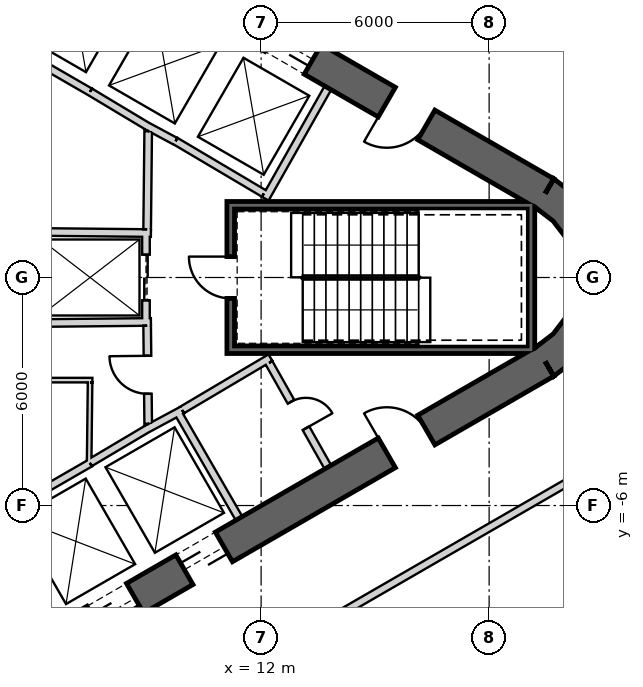
"""IFC4 building model, lengths in metres.
Left out: names, types, materials, properties, quantities, classifications, styles, units other than length and angle.
Written with IfcOpenShell. Run it as: python <this file> out.ifc"""

import sys

from ifc_helpers import new_model, si_unit, direction, frame, frame_2d, origin, place, context, subcontext, project, spatial, polyline, rectangle, outline, extrude, element, fill, save


model = new_model("IFC4")
c1 = context("Model", 3, precision=1e-05, world=origin(), true_north=direction((0.0, 1.0)))
c2 = subcontext(c1, "Body", "Model", "MODEL_VIEW")
j1 = project(units=[si_unit("LENGTHUNIT", "METRE"), si_unit("PLANEANGLEUNIT", "RADIAN")], contexts=[c1])
p1 = place(None, origin())
s1 = spatial("IfcSite", under=j1, at=p1, CompositionType="ELEMENT")
p2 = place(p1, origin())
s2 = spatial("IfcBuilding", under=s1, at=p2, CompositionType="ELEMENT")
p3 = place(p2, frame((0.0, 0.0, 94.7)))
s3 = spatial("IfcBuildingStorey", under=s2, at=p3, CompositionType="ELEMENT", Elevation=94.7)
p4 = place(p3, frame((19.475, 2.208, 0.0), z_axis=(0.0, 0.0, 1.0), x_axis=(-0.866028369851, 0.499994862586, 0.0)))
e1 = element("IfcWall", 1, at=p4, inside=s3, PredefinedType="SHEAR", context=c2, shape_type="SweptSolid", body=[
    extrude(rectangle(XDim=31.523, YDim=0.9, at=frame_2d((15.762, 0.0))), origin(), (0.0, 0.0, 1.0), 4.1),
])
p5 = place(p4, frame((7.062, 0.0, 0.0)))
e2 = element("IfcOpeningElement", 2, at=p5, cuts=e1, PredefinedType="OPENING", context=c2, shape_type="SweptSolid", body=[
    extrude(rectangle(XDim=1.2, YDim=2.4, at=frame_2d((0.6, 1.2))), frame((0.0, 0.46, 0.0), z_axis=(0.0, -1.0, 0.0), x_axis=(1.0, 0.0, 0.0)), (0.0, 0.0, 1.0), 0.92),
])
p6 = place(p4, frame((9.762, 0.0, 0.0)))
e3 = element("IfcOpeningElement", 3, at=p6, cuts=e1, PredefinedType="OPENING", context=c2, shape_type="SweptSolid", body=[
    extrude(rectangle(XDim=1.2, YDim=2.4, at=frame_2d((0.6, 1.2))), frame((0.0, 0.46, 0.0), z_axis=(0.0, -1.0, 0.0), x_axis=(1.0, 0.0, 0.0)), (0.0, 0.0, 1.0), 0.92),
])
p7 = place(p4, frame((12.462, 0.0, 0.0)))
e4 = element("IfcOpeningElement", 4, at=p7, cuts=e1, PredefinedType="OPENING", context=c2, shape_type="SweptSolid", body=[
    extrude(rectangle(XDim=1.2, YDim=2.4, at=frame_2d((0.6, 1.2))), frame((0.0, 0.46, 0.0), z_axis=(0.0, -1.0, 0.0), x_axis=(1.0, 0.0, 0.0)), (0.0, 0.0, 1.0), 0.92),
])
p8 = place(p4, frame((15.162, 0.0, 0.0)))
e5 = element("IfcOpeningElement", 5, at=p8, cuts=e1, PredefinedType="OPENING", context=c2, shape_type="SweptSolid", body=[
    extrude(rectangle(XDim=1.2, YDim=2.4, at=frame_2d((0.6, 1.2))), frame((0.0, 0.46, 0.0), z_axis=(0.0, -1.0, 0.0), x_axis=(1.0, 0.0, 0.0)), (0.0, 0.0, 1.0), 0.92),
])
p9 = place(p4, frame((17.862, 0.0, 0.0)))
e6 = element("IfcOpeningElement", 6, at=p9, cuts=e1, PredefinedType="OPENING", context=c2, shape_type="SweptSolid", body=[
    extrude(rectangle(XDim=1.2, YDim=2.4, at=frame_2d((0.6, 1.2))), frame((0.0, 0.46, 0.0), z_axis=(0.0, -1.0, 0.0), x_axis=(1.0, 0.0, 0.0)), (0.0, 0.0, 1.0), 0.92),
])
p10 = place(p4, frame((20.562, 0.0, 0.0)))
e7 = element("IfcOpeningElement", 7, at=p10, cuts=e1, PredefinedType="OPENING", context=c2, shape_type="SweptSolid", body=[
    extrude(rectangle(XDim=1.2, YDim=2.4, at=frame_2d((0.6, 1.2))), frame((0.0, 0.46, 0.0), z_axis=(0.0, -1.0, 0.0), x_axis=(1.0, 0.0, 0.0)), (0.0, 0.0, 1.0), 0.92),
])
p11 = place(p4, frame((23.262, 0.0, 0.0)))
e8 = element("IfcOpeningElement", 8, at=p11, cuts=e1, PredefinedType="OPENING", context=c2, shape_type="SweptSolid", body=[
    extrude(rectangle(XDim=1.2, YDim=2.4, at=frame_2d((0.6, 1.2))), frame((0.0, 0.46, 0.0), z_axis=(0.0, -1.0, 0.0), x_axis=(1.0, 0.0, 0.0)), (0.0, 0.0, 1.0), 0.92),
])
p12 = place(p4, frame((3.612, 0.0, 0.0)))
e9 = element("IfcOpeningElement", 9, at=p12, cuts=e1, PredefinedType="OPENING", context=c2, shape_type="SweptSolid", body=[
    extrude(rectangle(XDim=1.2, YDim=2.4, at=frame_2d((0.6, 1.2))), frame((0.0, 0.46, 0.0), z_axis=(0.0, -1.0, 0.0), x_axis=(1.0, 0.0, 0.0)), (0.0, 0.0, 1.0), 0.92),
])
p13 = place(p4, frame((26.712, 0.0, 0.0)))
e10 = element("IfcOpeningElement", 10, at=p13, cuts=e1, PredefinedType="OPENING", context=c2, shape_type="SweptSolid", body=[
    extrude(rectangle(XDim=1.2, YDim=2.4, at=frame_2d((0.6, 1.2))), frame((0.0, 0.46, 0.0), z_axis=(0.0, -1.0, 0.0), x_axis=(1.0, 0.0, 0.0)), (0.0, 0.0, 1.0), 0.92),
])
p14 = place(p3, frame((-7.825, -17.97, 0.0), z_axis=(0.0, 0.0, 1.0), x_axis=(0.866028369851, 0.499994862586, 0.0)))
e11 = element("IfcWall", 11, at=p14, inside=s3, PredefinedType="SHEAR", context=c2, shape_type="SweptSolid", body=[
    extrude(rectangle(XDim=31.523, YDim=0.9, at=frame_2d((15.762, 0.0))), origin(), (0.0, 0.0, 1.0), 4.1),
])
p15 = place(p14, frame((7.062, 0.0, 0.0)))
e12 = element("IfcOpeningElement", 12, at=p15, cuts=e11, PredefinedType="OPENING", context=c2, shape_type="SweptSolid", body=[
    extrude(rectangle(XDim=1.2, YDim=2.4, at=frame_2d((0.6, 1.2))), frame((0.0, 0.46, 0.0), z_axis=(0.0, -1.0, 0.0), x_axis=(1.0, 0.0, 0.0)), (0.0, 0.0, 1.0), 0.92),
])
p16 = place(p14, frame((9.762, 0.0, 0.0)))
e13 = element("IfcOpeningElement", 13, at=p16, cuts=e11, PredefinedType="OPENING", context=c2, shape_type="SweptSolid", body=[
    extrude(rectangle(XDim=1.2, YDim=2.4, at=frame_2d((0.6, 1.2))), frame((0.0, 0.46, 0.0), z_axis=(0.0, -1.0, 0.0), x_axis=(1.0, 0.0, 0.0)), (0.0, 0.0, 1.0), 0.92),
])
p17 = place(p14, frame((12.462, 0.0, 0.0)))
e14 = element("IfcOpeningElement", 14, at=p17, cuts=e11, PredefinedType="OPENING", context=c2, shape_type="SweptSolid", body=[
    extrude(rectangle(XDim=1.2, YDim=2.4, at=frame_2d((0.6, 1.2))), frame((0.0, 0.46, 0.0), z_axis=(0.0, -1.0, 0.0), x_axis=(1.0, 0.0, 0.0)), (0.0, 0.0, 1.0), 0.92),
])
p18 = place(p14, frame((15.162, 0.0, 0.0)))
e15 = element("IfcOpeningElement", 15, at=p18, cuts=e11, PredefinedType="OPENING", context=c2, shape_type="SweptSolid", body=[
    extrude(rectangle(XDim=1.2, YDim=2.4, at=frame_2d((0.6, 1.2))), frame((0.0, 0.46, 0.0), z_axis=(0.0, -1.0, 0.0), x_axis=(1.0, 0.0, 0.0)), (0.0, 0.0, 1.0), 0.92),
])
p19 = place(p14, frame((17.862, 0.0, 0.0)))
e16 = element("IfcOpeningElement", 16, at=p19, cuts=e11, PredefinedType="OPENING", context=c2, shape_type="SweptSolid", body=[
    extrude(rectangle(XDim=1.2, YDim=2.4, at=frame_2d((0.6, 1.2))), frame((0.0, 0.46, 0.0), z_axis=(0.0, -1.0, 0.0), x_axis=(1.0, 0.0, 0.0)), (0.0, 0.0, 1.0), 0.92),
])
p20 = place(p14, frame((20.562, 0.0, 0.0)))
e17 = element("IfcOpeningElement", 17, at=p20, cuts=e11, PredefinedType="OPENING", context=c2, shape_type="SweptSolid", body=[
    extrude(rectangle(XDim=1.2, YDim=2.4, at=frame_2d((0.6, 1.2))), frame((0.0, 0.46, 0.0), z_axis=(0.0, -1.0, 0.0), x_axis=(1.0, 0.0, 0.0)), (0.0, 0.0, 1.0), 0.92),
])
p21 = place(p14, frame((26.712, 0.0, 0.0)))
e18 = element("IfcOpeningElement", 18, at=p21, cuts=e11, PredefinedType="OPENING", context=c2, shape_type="SweptSolid", body=[
    extrude(rectangle(XDim=1.2, YDim=2.4, at=frame_2d((0.6, 1.2))), frame((0.0, 0.46, 0.0), z_axis=(0.0, -1.0, 0.0), x_axis=(1.0, 0.0, 0.0)), (0.0, 0.0, 1.0), 0.92),
])
p22 = place(p14, frame((3.612, 0.0, 0.0)))
e19 = element("IfcOpeningElement", 19, at=p22, cuts=e11, PredefinedType="OPENING", context=c2, shape_type="SweptSolid", body=[
    extrude(rectangle(XDim=1.2, YDim=2.4, at=frame_2d((0.6, 1.2))), frame((0.0, 0.46, 0.0), z_axis=(0.0, -1.0, 0.0), x_axis=(1.0, 0.0, 0.0)), (0.0, 0.0, 1.0), 0.92),
])
p23 = place(p3, origin())
e20 = element("IfcWall", 20, at=p23, inside=s3, PredefinedType="SHEAR", context=c2, shape_type="SweptSolid", body=[
    extrude(outline(polyline([(19.7, -2.598), (20.321, -2.121), (20.798, -1.5), (21.098, -0.777), (21.2, 0.0), (21.098, 0.777), (20.798, 1.5), (20.321, 2.121), (19.7, 2.598), (19.25, 1.819), (19.685, 1.485), (20.019, 1.05), (20.229, 0.543), (20.3, 0.0), (20.229, -0.543), (20.019, -1.05), (19.685, -1.485), (19.25, -1.819), (19.7, -2.598)])), origin(), (0.0, 0.0, 1.0), 4.1),
])
p24 = place(p3, frame((7.497, 4.886, 0.0), z_axis=(0.0, 0.0, 1.0), x_axis=(-0.866030989016, 0.499990325971, 0.0)))
e21 = element("IfcWall", 21, at=p24, inside=s3, PredefinedType="PLUMBINGWALL", context=c2, shape_type="SweptSolid", body=[
    extrude(rectangle(XDim=8.1, YDim=0.2, at=frame_2d((4.05, 0.0))), origin(), (0.0, 0.0, 1.0), 3.8),
])
p25 = place(p3, frame((12.11, 2.073, 0.0), z_axis=(0.0, 0.0, 1.0), x_axis=(0.49196600604, 0.870614408852, 0.0)))
e22 = element("IfcWall", 22, at=p25, inside=s3, PredefinedType="PLUMBINGWALL", context=c2, shape_type="SweptSolid", body=[
    extrude(rectangle(XDim=3.35, YDim=0.2, at=frame_2d((1.675, 0.0))), origin(), (0.0, 0.0, 1.0), 3.8),
])
p26 = place(p3, frame((12.073, 2.211, 0.0), z_axis=(0.0, 0.0, 1.0), x_axis=(-0.860438357912, 0.509554542943, 0.0)))
e23 = element("IfcWall", 23, at=p26, inside=s3, PredefinedType="PLUMBINGWALL", context=c2, shape_type="SweptSolid", body=[
    extrude(rectangle(XDim=2.7, YDim=0.2, at=frame_2d((1.35, 0.0))), origin(), (0.0, 0.0, 1.0), 3.8),
])
p27 = place(p3, frame((9.748, 3.583, 0.0), z_axis=(0.0, 0.0, 1.0), x_axis=(-0.880917147855, 0.473270513147, 0.0)))
e24 = element("IfcWall", 24, at=p27, inside=s3, PredefinedType="PLUMBINGWALL", context=c2, shape_type="SweptSolid", body=[
    extrude(rectangle(XDim=0.878, YDim=0.2, at=frame_2d((0.439, 0.0))), origin(), (0.0, 0.0, 1.0), 3.8),
])
p28 = place(p3, frame((9.079, 3.937, 0.0), z_axis=(0.0, 0.0, 1.0), x_axis=(-0.857516281273, 0.51445682749, 0.0)))
e25 = element("IfcWall", 25, at=p28, inside=s3, PredefinedType="PLUMBINGWALL", context=c2, shape_type="SweptSolid", body=[
    extrude(rectangle(XDim=1.845, YDim=0.2, at=frame_2d((0.922, 0.0))), origin(), (0.0, 0.0, 1.0), 3.8),
])
p29 = place(p3, frame((0.483, -8.936, 0.0), z_axis=(0.0, 0.0, 1.0), x_axis=(0.866030989016, 0.499990325971, 0.0)))
e26 = element("IfcWall", 26, at=p29, inside=s3, PredefinedType="PLUMBINGWALL", context=c2, shape_type="SweptSolid", body=[
    extrude(rectangle(XDim=8.1, YDim=0.2, at=frame_2d((4.05, 0.0))), origin(), (0.0, 0.0, 1.0), 3.8),
])
p30 = place(p3, frame((9.795, -3.525, 0.0), z_axis=(0.0, 0.0, 1.0), x_axis=(0.499984717929, -0.866034226713, 0.0)))
e27 = element("IfcWall", 27, at=p30, inside=s3, PredefinedType="PLUMBINGWALL", context=c2, shape_type="SweptSolid", body=[
    extrude(rectangle(XDim=3.25, YDim=0.2, at=frame_2d((1.625, 0.0))), origin(), (0.0, 0.0, 1.0), 3.8),
])
p31 = place(p3, frame((8.974, -3.999, 0.0), z_axis=(0.0, 0.0, 1.0), x_axis=(0.880907015104, 0.473289373154, 0.0)))
e28 = element("IfcWall", 28, at=p31, inside=s3, PredefinedType="PLUMBINGWALL", context=c2, shape_type="SweptSolid", body=[
    extrude(rectangle(XDim=1.078, YDim=0.2, at=frame_2d((0.539, 0.0))), origin(), (0.0, 0.0, 1.0), 3.8),
])
p32 = place(p3, frame((7.493, -4.878, 0.0), z_axis=(0.0, 0.0, 1.0), x_axis=(0.859981807212, 0.510324691999, 0.0)))
e29 = element("IfcWall", 29, at=p32, inside=s3, PredefinedType="PLUMBINGWALL", context=c2, shape_type="SweptSolid", body=[
    extrude(rectangle(XDim=1.845, YDim=0.2, at=frame_2d((0.922, 0.0))), origin(), (0.0, 0.0, 1.0), 3.8),
])
p33 = place(p3, frame((19.2, 1.9, -0.3), z_axis=(0.0, 0.0, 1.0), x_axis=(-1.0, 0.0, 0.0)))
e30 = element("IfcWall", 30, at=p33, inside=s3, PredefinedType="SHEAR", context=c2, shape_type="SweptSolid", body=[
    extrude(rectangle(XDim=8.1, YDim=0.2, at=frame_2d((4.05, 0.0))), origin(), (0.0, 0.0, 1.0), 4.1),
])
p34 = place(p3, frame((19.1, -2.0, -0.3), z_axis=(0.0, 0.0, 1.0), x_axis=(0.0, 1.0, 0.0)))
e31 = element("IfcWall", 31, at=p34, inside=s3, PredefinedType="SHEAR", context=c2, shape_type="SweptSolid", body=[
    extrude(rectangle(XDim=3.8, YDim=0.2, at=frame_2d((1.9, 0.0))), origin(), (0.0, 0.0, 1.0), 4.1),
])
p35 = place(p3, frame((11.1, -1.9, -0.3), z_axis=(0.0, 0.0, 1.0), x_axis=(1.0, 0.0, 0.0)))
e32 = element("IfcWall", 32, at=p35, inside=s3, PredefinedType="SHEAR", context=c2, shape_type="SweptSolid", body=[
    extrude(rectangle(XDim=7.9, YDim=0.2, at=frame_2d((3.95, 0.0))), origin(), (0.0, 0.0, 1.0), 4.1),
])
p36 = place(p3, frame((11.2, -1.8, -0.3), z_axis=(0.0, 0.0, 1.0), x_axis=(0.0, 1.0, 0.0)))
e33 = element("IfcWall", 33, at=p36, inside=s3, PredefinedType="SHEAR", context=c2, shape_type="SweptSolid", body=[
    extrude(rectangle(XDim=3.6, YDim=0.2, at=frame_2d((1.8, 0.0))), origin(), (0.0, 0.0, 1.0), 4.1),
])
p37 = place(p36, frame((1.25, 0.0, 0.3)))
e34 = element("IfcOpeningElement", 34, at=p37, cuts=e33, PredefinedType="OPENING", context=c2, shape_type="SweptSolid", body=[
    extrude(rectangle(XDim=1.1, YDim=2.1, at=frame_2d((0.55, 1.05))), frame((0.0, 0.11, 0.0), z_axis=(0.0, -1.0, 0.0), x_axis=(1.0, 0.0, 0.0)), (0.0, 0.0, 1.0), 0.22),
])
p38 = place(p3, frame((8.97, 1.2, 0.0), z_axis=(0.0, 0.0, 1.0), x_axis=(0.0, -1.0, 0.0)))
e35 = element("IfcWall", 35, at=p38, inside=s3, PredefinedType="PLUMBINGWALL", context=c2, shape_type="SweptSolid", body=[
    extrude(rectangle(XDim=2.4, YDim=0.2, at=frame_2d((1.2, 0.0))), origin(), (0.0, 0.0, 1.0), 3.8),
])
p39 = place(p38, frame((0.6, 0.0, 0.0)))
e36 = element("IfcOpeningElement", 36, at=p39, cuts=e35, PredefinedType="OPENING", context=c2, shape_type="SweptSolid", body=[
    extrude(rectangle(XDim=1.2, YDim=2.4, at=frame_2d((0.6, 1.2))), frame((0.0, 0.11, 0.0), z_axis=(0.0, -1.0, 0.0), x_axis=(1.0, 0.0, 0.0)), (0.0, 0.0, 1.0), 0.22),
])
p40 = place(p3, frame((6.0, 1.2, 0.0), z_axis=(0.0, 0.0, 1.0), x_axis=(0.999949988, -0.010001074852, 0.0)))
e37 = element("IfcWall", 37, at=p40, inside=s3, PredefinedType="PLUMBINGWALL", context=c2, shape_type="SweptSolid", body=[
    extrude(rectangle(XDim=3.1, YDim=0.2, at=frame_2d((1.55, 0.0))), origin(), (0.0, 0.0, 1.0), 3.8),
])
p41 = place(p3, frame((5.9, -1.201, 0.0), z_axis=(0.0, 0.0, 1.0), x_axis=(0.999950064753, 0.009993397809, 0.0)))
e38 = element("IfcWall", 38, at=p41, inside=s3, PredefinedType="PLUMBINGWALL", context=c2, shape_type="SweptSolid", body=[
    extrude(rectangle(XDim=3.2, YDim=0.2, at=frame_2d((1.6, 0.0))), origin(), (0.0, 0.0, 1.0), 3.8),
])
p42 = place(p3, frame((12.245, -2.109, 0.0), z_axis=(0.0, 0.0, 1.0), x_axis=(-0.860414880418, -0.509594185166, 0.0)))
e39 = element("IfcWall", 39, at=p42, inside=s3, PredefinedType="PARTITIONING", context=c2, shape_type="SweptSolid", body=[
    extrude(rectangle(XDim=2.7, YDim=0.2, at=frame_2d((1.35, 0.0))), origin(), (0.0, 0.0, 1.0), 3.8),
])
p43 = place(p3, frame((13.758, -4.99, 0.0), z_axis=(0.0, 0.0, 1.0), x_axis=(-0.491993409184, 0.87059892334, 0.0)))
e40 = element("IfcWall", 40, at=p43, inside=s3, PredefinedType="PARTITIONING", context=c2, shape_type="SweptSolid", body=[
    extrude(rectangle(XDim=3.15, YDim=0.2, at=frame_2d((1.575, 0.0))), origin(), (0.0, 0.0, 1.0), 3.8),
])
p44 = place(p43, frame((1.175, 0.0, 0.0)))
e41 = element("IfcOpeningElement", 41, at=p44, cuts=e40, PredefinedType="OPENING", context=c2, shape_type="SweptSolid", body=[
    extrude(rectangle(XDim=0.8, YDim=2.1, at=frame_2d((0.4, 1.05))), frame((0.0, 0.11, 0.0), z_axis=(0.0, -1.0, 0.0), x_axis=(1.0, 0.0, 0.0)), (0.0, 0.0, 1.0), 0.22),
])
p45 = place(p3, frame((9.001, 1.27, 0.0), z_axis=(0.0, 0.0, 1.0), x_axis=(0.010784614026, 0.999941844359, 0.0)))
e42 = element("IfcWall", 42, at=p45, inside=s3, PredefinedType="PARTITIONING", context=c2, shape_type="SweptSolid", body=[
    extrude(rectangle(XDim=2.581, YDim=0.2, at=frame_2d((1.291, 0.0))), origin(), (0.0, 0.0, 1.0), 3.8),
])
p46 = place(p3, frame((9.029, -3.851, 0.0), z_axis=(0.0, 0.0, 1.0), x_axis=(-0.010783593937, 0.99994185536, 0.0)))
e43 = element("IfcWall", 43, at=p46, inside=s3, PredefinedType="PARTITIONING", context=c2, shape_type="SweptSolid", body=[
    extrude(rectangle(XDim=2.581, YDim=0.2, at=frame_2d((1.291, 0.0))), origin(), (0.0, 0.0, 1.0), 3.8),
])
p47 = place(p46, frame((0.791, 0.0, 0.0)))
e44 = element("IfcOpeningElement", 44, at=p47, cuts=e43, PredefinedType="OPENING", context=c2, shape_type="SweptSolid", body=[
    extrude(rectangle(XDim=1.0, YDim=2.1, at=frame_2d((0.5, 1.05))), frame((0.0, 0.11, 0.0), z_axis=(0.0, -1.0, 0.0), x_axis=(1.0, 0.0, 0.0)), (0.0, 0.0, 1.0), 0.22),
])
p48 = place(p3, frame((7.56, -2.7, 0.0), z_axis=(0.0, 0.0, 1.0), x_axis=(-1.0, 0.0, 0.0)))
e45 = element("IfcWall", 45, at=p48, inside=s3, PredefinedType="PARTITIONING", context=c2, shape_type="SweptSolid", body=[
    extrude(rectangle(XDim=3.0, YDim=0.12, at=frame_2d((1.5, 0.0))), origin(), (0.0, 0.0, 1.0), 3.8),
])
p49 = place(p3, frame((7.475, -4.865, 0.0), z_axis=(0.0, 0.0, 1.0), x_axis=(0.011716133148, 0.999931363757, 0.0)))
e46 = element("IfcWall", 46, at=p49, inside=s3, PredefinedType="PARTITIONING", context=c2, shape_type="SweptSolid", body=[
    extrude(rectangle(XDim=2.105, YDim=0.12, at=frame_2d((1.052, 0.0))), origin(), (0.0, 0.0, 1.0), 3.8),
])
p50 = place(p3, frame((22.727, 5.931, 0.0), z_axis=(0.0, 0.0, 1.0), x_axis=(-0.866021821949, 0.50000620387, 0.0)))
e47 = element("IfcWall", 47, at=p50, inside=s3, PredefinedType="PARTITIONING", context=c2, shape_type="SweptSolid", body=[
    extrude(rectangle(XDim=11.197, YDim=0.2, at=frame_2d((5.598, 0.0))), origin(), (0.0, 0.0, 1.0), 2.98),
])
p51 = place(p50, frame((5.136, 0.0, 0.0)))
e48 = element("IfcOpeningElement", 48, at=p51, cuts=e47, PredefinedType="OPENING", context=c2, shape_type="SweptSolid", body=[
    extrude(rectangle(XDim=1.0, YDim=2.1, at=frame_2d((0.5, 1.05))), frame((0.0, 0.11, 0.0), z_axis=(0.0, -1.0, 0.0), x_axis=(1.0, 0.0, 0.0)), (0.0, 0.0, 1.0), 0.22),
])
p52 = place(p3, frame((-3.072, -18.747, 0.0), z_axis=(0.0, 0.0, 1.0), x_axis=(0.866027760718, 0.499995917648, 0.0)))
e49 = element("IfcWall", 49, at=p52, inside=s3, PredefinedType="PARTITIONING", context=c2, shape_type="SweptSolid", body=[
    extrude(rectangle(XDim=28.233, YDim=0.2, at=frame_2d((14.117, 0.0))), origin(), (0.0, 0.0, 1.0), 2.98),
])
p53 = place(p52, frame((13.617, 0.0, 0.0)))
e50 = element("IfcOpeningElement", 50, at=p53, cuts=e49, PredefinedType="OPENING", context=c2, shape_type="SweptSolid", body=[
    extrude(rectangle(XDim=1.0, YDim=2.1, at=frame_2d((0.5, 1.05))), frame((0.0, 0.11, 0.0), z_axis=(0.0, -1.0, 0.0), x_axis=(1.0, 0.0, 0.0)), (0.0, 0.0, 1.0), 0.22),
])
p54 = place(p37, origin())
e51 = element("IfcDoor", 51, at=p54, inside=s3, OperationType="SINGLE_SWING_RIGHT", PredefinedType="USERDEFINED", context=c2, shape_type="SweptSolid", body=[
    extrude(rectangle(XDim=1.1, YDim=2.1, at=frame_2d((0.55, 1.05))), frame((0.0, 0.025, 0.0), z_axis=(0.0, -1.0, 0.0), x_axis=(1.0, 0.0, 0.0)), (0.0, 0.0, 1.0), 0.05),
])
fill(e34, e51)
p55 = place(p47, origin())
e52 = element("IfcDoor", 52, at=p55, inside=s3, OperationType="SINGLE_SWING_RIGHT", PredefinedType="USERDEFINED", context=c2, shape_type="SweptSolid", body=[
    extrude(rectangle(XDim=1.0, YDim=2.1, at=frame_2d((0.5, 1.05))), frame((0.0, 0.025, 0.0), z_axis=(0.0, -1.0, 0.0), x_axis=(1.0, 0.0, 0.0)), (0.0, 0.0, 1.0), 0.05),
])
fill(e44, e52)
p56 = place(p39, origin())
e53 = element("IfcDoor", 53, at=p56, inside=s3, OperationType="SLIDING_TO_LEFT", PredefinedType="USERDEFINED", context=c2, shape_type="SweptSolid", body=[
    extrude(rectangle(XDim=1.2, YDim=2.4, at=frame_2d((0.6, 1.2))), frame((0.0, 0.025, 0.0), z_axis=(0.0, -1.0, 0.0), x_axis=(1.0, 0.0, 0.0)), (0.0, 0.0, 1.0), 0.05),
])
fill(e36, e53)
p57 = place(p44, origin())
e54 = element("IfcDoor", 54, at=p57, inside=s3, OperationType="SINGLE_SWING_RIGHT", PredefinedType="USERDEFINED", context=c2, shape_type="SweptSolid", body=[
    extrude(rectangle(XDim=0.8, YDim=2.1, at=frame_2d((0.4, 1.05))), frame((0.0, 0.025, 0.0), z_axis=(0.0, -1.0, 0.0), x_axis=(1.0, 0.0, 0.0)), (0.0, 0.0, 1.0), 0.05),
])
fill(e41, e54)
p58 = place(p5, origin())
e55 = element("IfcDoor", 55, at=p58, inside=s3, OperationType="SLIDING_TO_LEFT", PredefinedType="USERDEFINED", context=c2, shape_type="SweptSolid", body=[
    extrude(rectangle(XDim=1.2, YDim=2.4, at=frame_2d((0.6, 1.2))), frame((0.0, 0.025, 0.0), z_axis=(0.0, -1.0, 0.0), x_axis=(1.0, 0.0, 0.0)), (0.0, 0.0, 1.0), 0.05),
])
fill(e2, e55)
p59 = place(p19, origin())
e56 = element("IfcDoor", 56, at=p59, inside=s3, OperationType="SLIDING_TO_LEFT", PredefinedType="USERDEFINED", context=c2, shape_type="SweptSolid", body=[
    extrude(rectangle(XDim=1.2, YDim=2.4, at=frame_2d((0.6, 1.2))), frame((0.0, 0.025, 0.0), z_axis=(0.0, -1.0, 0.0), x_axis=(1.0, 0.0, 0.0)), (0.0, 0.0, 1.0), 0.05),
])
fill(e16, e56)
p60 = place(p20, origin())
e57 = element("IfcDoor", 57, at=p60, inside=s3, OperationType="SLIDING_TO_LEFT", PredefinedType="USERDEFINED", context=c2, shape_type="SweptSolid", body=[
    extrude(rectangle(XDim=1.2, YDim=2.4, at=frame_2d((0.6, 1.2))), frame((0.0, 0.025, 0.0), z_axis=(0.0, -1.0, 0.0), x_axis=(1.0, 0.0, 0.0)), (0.0, 0.0, 1.0), 0.05),
])
fill(e17, e57)
p61 = place(p21, origin())
e58 = element("IfcDoor", 58, at=p61, inside=s3, OperationType="SINGLE_SWING_LEFT", PredefinedType="USERDEFINED", context=c2, shape_type="SweptSolid", body=[
    extrude(rectangle(XDim=1.2, YDim=2.4, at=frame_2d((0.6, 1.2))), frame((0.0, 0.025, 0.0), z_axis=(0.0, -1.0, 0.0), x_axis=(1.0, 0.0, 0.0)), (0.0, 0.0, 1.0), 0.05),
])
fill(e18, e58)
p62 = place(p12, origin())
e59 = element("IfcDoor", 59, at=p62, inside=s3, OperationType="SINGLE_SWING_LEFT", PredefinedType="USERDEFINED", context=c2, shape_type="SweptSolid", body=[
    extrude(rectangle(XDim=1.2, YDim=2.4, at=frame_2d((0.6, 1.2))), frame((0.0, 0.025, 0.0), z_axis=(0.0, -1.0, 0.0), x_axis=(1.0, 0.0, 0.0)), (0.0, 0.0, 1.0), 0.05),
])
fill(e9, e59)
save(model, sys.argv[1])
